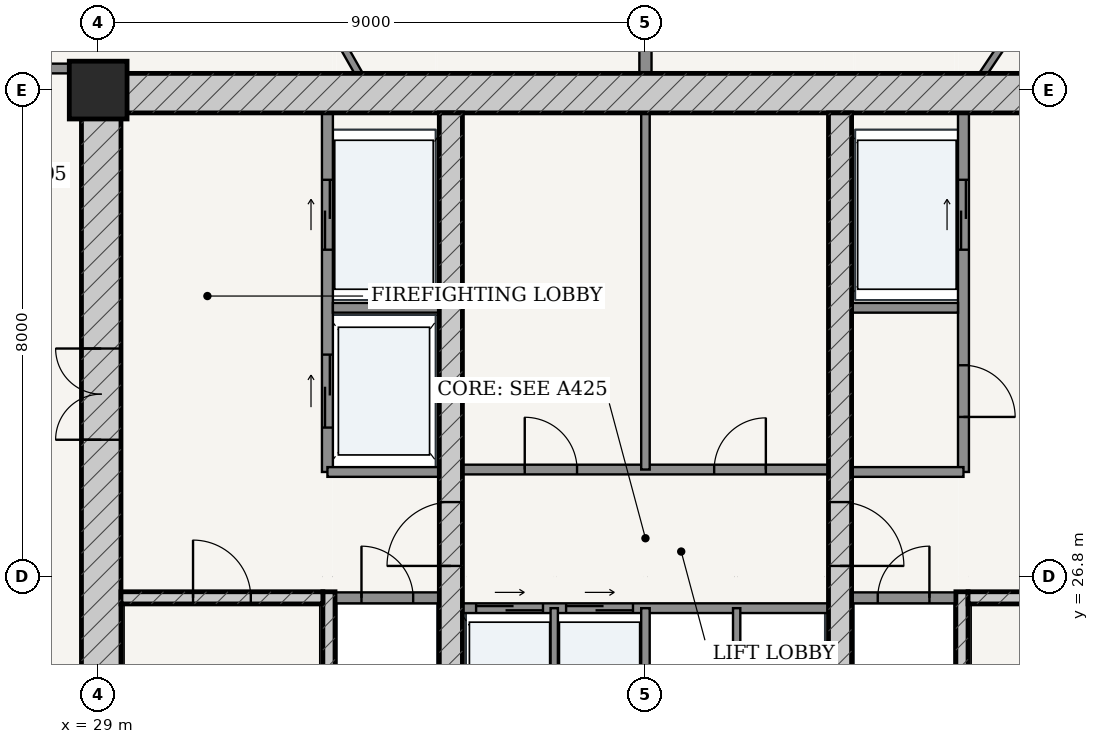
"""IFC4 building model, lengths in metres.
Left out: names, types, materials, properties, quantities, classifications, styles, units other than length and angle.
Written with IfcOpenShell. Run it as: python <this file> out.ifc"""

import sys

from ifc_helpers import new_model, si_unit, direction, frame, frame_2d, origin, origin_2d, place, context, subcontext, project, spatial, rectangle, extrude, source, transform, mapped, element, fill, save


model = new_model("IFC4")
c1 = context("Model", 3, precision=1e-05, world=origin(), true_north=direction((-0.2419218956, 0.970295726276)))
c2 = subcontext(c1, "Body", "Model", "MODEL_VIEW")
j1 = project(units=[si_unit("LENGTHUNIT", "METRE"), si_unit("PLANEANGLEUNIT", "RADIAN")], contexts=[c1])
p1 = place(None, origin())
s1 = spatial("IfcSite", under=j1, at=p1, CompositionType="ELEMENT")
p2 = place(p1, origin())
s2 = spatial("IfcBuilding", under=s1, at=p2, CompositionType="ELEMENT")
p3 = place(p2, frame((0.0, 0.0, 171.4)))
s3 = spatial("IfcBuildingStorey", under=s2, at=p3, CompositionType="ELEMENT", Elevation=171.4)
p4 = place(p3, frame((29.0, 34.8, 0.0), z_axis=(0.0, 0.0, 1.0), x_axis=(1.0, 0.0, 0.0)))
e1 = element("IfcColumn", 1, at=p4, inside=s3, PredefinedType="COLUMN", context=c2, shape_type="SweptSolid", body=[
    extrude(rectangle(XDim=0.95, YDim=0.95, at=origin_2d()), origin(), (0.0, 0.0, 1.0), 3.6),
])
p5 = place(p3, frame((28.725, 34.75, 0.0), z_axis=(0.0, 0.0, 1.0), x_axis=(1.0, 0.0, 0.0)))
e2 = element("IfcWall", 2, at=p5, inside=s3, PredefinedType="SHEAR", context=c2, shape_type="SweptSolid", body=[
    extrude(rectangle(XDim=18.55, YDim=0.65, at=frame_2d((9.275, 0.0))), origin(), (0.0, 0.0, 1.0), 3.33),
])
p6 = place(p3, frame((29.05, 19.175, 0.0), z_axis=(0.0, 0.0, 1.0), x_axis=(0.0, 1.0, 0.0)))
e3 = element("IfcWall", 3, at=p6, inside=s3, PredefinedType="SHEAR", context=c2, shape_type="SweptSolid", body=[
    extrude(rectangle(XDim=15.25, YDim=0.65, at=frame_2d((7.625, 0.0))), origin(), (0.0, 0.0, 1.0), 3.33),
])
p7 = place(p6, frame((9.875, 0.0, 0.0)))
e4 = element("IfcOpeningElement", 4, at=p7, cuts=e3, PredefinedType="OPENING", context=c2, shape_type="SweptSolid", body=[
    extrude(rectangle(XDim=1.5, YDim=2.2, at=frame_2d((0.75, 1.1))), frame((0.0, 0.335, 0.0), z_axis=(0.0, -1.0, 0.0), x_axis=(1.0, 0.0, 0.0)), (0.0, 0.0, 1.0), 0.67),
])
p8 = place(p3, frame((32.795, 19.175, 0.0), z_axis=(0.0, 0.0, 1.0), x_axis=(0.0, 1.0, 0.0)))
e5 = element("IfcWall", 5, at=p8, inside=s3, PredefinedType="SOLIDWALL", context=c2, shape_type="SweptSolid", body=[
    extrude(rectangle(XDim=7.375, YDim=0.2, at=frame_2d((3.688, 0.0))), origin(), (0.0, 0.0, 1.0), 3.33),
])
p9 = place(p3, frame((29.375, 26.45, 0.0), z_axis=(0.0, 0.0, 1.0), x_axis=(1.0, 0.0, 0.0)))
e6 = element("IfcWall", 6, at=p9, inside=s3, PredefinedType="SOLIDWALL", context=c2, shape_type="SweptSolid", body=[
    extrude(rectangle(XDim=3.32, YDim=0.2, at=frame_2d((1.66, 0.0))), origin(), (0.0, 0.0, 1.0), 3.33),
])
p10 = place(p9, frame((1.185, 0.0, 0.0)))
e7 = element("IfcOpeningElement", 7, at=p10, cuts=e6, PredefinedType="OPENING", context=c2, shape_type="SweptSolid", body=[
    extrude(rectangle(XDim=0.95, YDim=2.15, at=frame_2d((0.475, 1.075))), frame((0.0, 0.11, 0.0), z_axis=(0.0, -1.0, 0.0), x_axis=(1.0, 0.0, 0.0)), (0.0, 0.0, 1.0), 0.22),
])
p11 = place(p3, frame((43.205, 19.175, 0.0), z_axis=(0.0, 0.0, 1.0), x_axis=(0.0, 1.0, 0.0)))
e8 = element("IfcWall", 8, at=p11, inside=s3, PredefinedType="SOLIDWALL", context=c2, shape_type="SweptSolid", body=[
    extrude(rectangle(XDim=7.375, YDim=0.2, at=frame_2d((3.688, 0.0))), origin(), (0.0, 0.0, 1.0), 3.33),
])
p12 = place(p3, frame((43.305, 26.45, 0.0), z_axis=(0.0, 0.0, 1.0), x_axis=(1.0, 0.0, 0.0)))
e9 = element("IfcWall", 9, at=p12, inside=s3, PredefinedType="SOLIDWALL", context=c2, shape_type="SweptSolid", body=[
    extrude(rectangle(XDim=3.32, YDim=0.2, at=frame_2d((1.66, 0.0))), origin(), (0.0, 0.0, 1.0), 3.33),
])
p13 = place(p12, frame((1.185, 0.0, 0.0)))
e10 = element("IfcOpeningElement", 10, at=p13, cuts=e9, PredefinedType="OPENING", context=c2, shape_type="SweptSolid", body=[
    extrude(rectangle(XDim=0.95, YDim=2.15, at=frame_2d((0.475, 1.075))), frame((0.0, 0.11, 0.0), z_axis=(0.0, -1.0, 0.0), x_axis=(1.0, 0.0, 0.0)), (0.0, 0.0, 1.0), 0.22),
])
p14 = place(p3, frame((34.8, 19.175, 0.0), z_axis=(0.0, 0.0, 1.0), x_axis=(0.0, 1.0, 0.0)))
e11 = element("IfcWall", 11, at=p14, inside=s3, PredefinedType="SHEAR", context=c2, shape_type="SweptSolid", body=[
    extrude(rectangle(XDim=15.25, YDim=0.38, at=frame_2d((7.625, 0.0))), origin(), (0.0, 0.0, 1.0), 3.33),
])
p15 = place(p14, frame((7.8, 0.0, 0.0)))
e12 = element("IfcOpeningElement", 12, at=p15, cuts=e11, PredefinedType="OPENING", context=c2, shape_type="SweptSolid", body=[
    extrude(rectangle(XDim=1.05, YDim=2.15, at=frame_2d((0.525, 1.075))), frame((0.0, 0.2, 0.0), z_axis=(0.0, -1.0, 0.0), x_axis=(1.0, 0.0, 0.0)), (0.0, 0.0, 1.0), 0.4),
])
p16 = place(p3, frame((41.2, 19.175, 0.0), z_axis=(0.0, 0.0, 1.0), x_axis=(0.0, 1.0, 0.0)))
e13 = element("IfcWall", 13, at=p16, inside=s3, PredefinedType="SHEAR", context=c2, shape_type="SweptSolid", body=[
    extrude(rectangle(XDim=15.25, YDim=0.38, at=frame_2d((7.625, 0.0))), origin(), (0.0, 0.0, 1.0), 3.33),
])
p17 = place(p16, frame((7.8, 0.0, 0.0)))
e14 = element("IfcOpeningElement", 14, at=p17, cuts=e13, PredefinedType="OPENING", context=c2, shape_type="SweptSolid", body=[
    extrude(rectangle(XDim=1.05, YDim=2.15, at=frame_2d((0.525, 1.075))), frame((0.0, 0.2, 0.0), z_axis=(0.0, -1.0, 0.0), x_axis=(1.0, 0.0, 0.0)), (0.0, 0.0, 1.0), 0.4),
])
p18 = place(p3, frame((32.9, 26.45, 0.0), z_axis=(0.0, 0.0, 1.0), x_axis=(1.0, 0.0, 0.0)))
e15 = element("IfcWall", 15, at=p18, inside=s3, PredefinedType="PARTITIONING", context=c2, shape_type="SweptSolid", body=[
    extrude(rectangle(XDim=1.71, YDim=0.18, at=frame_2d((0.855, 0.0))), origin(), (0.0, 0.0, 1.0), 3.33),
])
p19 = place(p18, frame((0.43, 0.0, 0.0)))
e16 = element("IfcOpeningElement", 16, at=p19, cuts=e15, PredefinedType="OPENING", context=c2, shape_type="SweptSolid", body=[
    extrude(rectangle(XDim=0.85, YDim=2.1, at=frame_2d((0.425, 1.05))), frame((0.0, 0.1, 0.0), z_axis=(0.0, -1.0, 0.0), x_axis=(1.0, 0.0, 0.0)), (0.0, 0.0, 1.0), 0.2),
])
p20 = place(p3, frame((41.39, 26.45, 0.0), z_axis=(0.0, 0.0, 1.0), x_axis=(1.0, 0.0, 0.0)))
e17 = element("IfcWall", 17, at=p20, inside=s3, PredefinedType="PARTITIONING", context=c2, shape_type="SweptSolid", body=[
    extrude(rectangle(XDim=1.71, YDim=0.18, at=frame_2d((0.855, 0.0))), origin(), (0.0, 0.0, 1.0), 3.33),
])
p21 = place(p20, frame((0.43, 0.0, 0.0)))
e18 = element("IfcOpeningElement", 18, at=p21, cuts=e17, PredefinedType="OPENING", context=c2, shape_type="SweptSolid", body=[
    extrude(rectangle(XDim=0.85, YDim=2.1, at=frame_2d((0.425, 1.05))), frame((0.0, 0.1, 0.0), z_axis=(0.0, -1.0, 0.0), x_axis=(1.0, 0.0, 0.0)), (0.0, 0.0, 1.0), 0.2),
])
p22 = place(p3, frame((32.77, 28.52, 0.0), z_axis=(0.0, 0.0, 1.0), x_axis=(0.0, 1.0, 0.0)))
e19 = element("IfcWall", 19, at=p22, inside=s3, PredefinedType="PARTITIONING", context=c2, shape_type="SweptSolid", body=[
    extrude(rectangle(XDim=5.905, YDim=0.18, at=frame_2d((2.953, 0.0))), origin(), (0.0, 0.0, 1.0), 3.33),
])
p23 = place(p22, frame((3.655, 0.0, 0.0)))
e20 = element("IfcOpeningElement", 20, at=p23, cuts=e19, PredefinedType="OPENING", context=c2, shape_type="SweptSolid", body=[
    extrude(rectangle(XDim=1.15, YDim=2.2, at=frame_2d((0.575, 1.1))), frame((0.0, 0.1, 0.0), z_axis=(0.0, -1.0, 0.0), x_axis=(1.0, 0.0, 0.0)), (0.0, 0.0, 1.0), 0.2),
])
p24 = place(p22, frame((0.73, 0.0, 0.0)))
e21 = element("IfcOpeningElement", 21, at=p24, cuts=e19, PredefinedType="OPENING", context=c2, shape_type="SweptSolid", body=[
    extrude(rectangle(XDim=1.2, YDim=2.25, at=frame_2d((0.6, 1.125))), frame((0.0, 0.1, 0.0), z_axis=(0.0, -1.0, 0.0), x_axis=(1.0, 0.0, 0.0)), (0.0, 0.0, 1.0), 0.2),
])
p25 = place(p3, frame((32.86, 31.22, 0.0), z_axis=(0.0, 0.0, 1.0), x_axis=(1.0, 0.0, 0.0)))
e22 = element("IfcWall", 22, at=p25, inside=s3, PredefinedType="PARTITIONING", context=c2, shape_type="SweptSolid", body=[
    extrude(rectangle(XDim=1.75, YDim=0.16, at=frame_2d((0.875, 0.0))), origin(), (0.0, 0.0, 1.0), 3.33),
])
p26 = place(p3, frame((32.77, 28.52, 0.0), z_axis=(0.0, 0.0, 1.0), x_axis=(1.0, 0.0, 0.0)))
e23 = element("IfcWall", 23, at=p26, inside=s3, PredefinedType="PARTITIONING", context=c2, shape_type="SweptSolid", body=[
    extrude(rectangle(XDim=1.84, YDim=0.16, at=frame_2d((0.92, 0.0))), origin(), (0.0, 0.0, 1.0), 3.33),
])
p27 = place(p3, frame((43.23, 28.52, 0.0), z_axis=(0.0, 0.0, 1.0), x_axis=(0.0, 1.0, 0.0)))
e24 = element("IfcWall", 24, at=p27, inside=s3, PredefinedType="PARTITIONING", context=c2, shape_type="SweptSolid", body=[
    extrude(rectangle(XDim=5.905, YDim=0.18, at=frame_2d((2.953, 0.0))), origin(), (0.0, 0.0, 1.0), 3.33),
])
p28 = place(p27, frame((0.905, 0.0, 0.0)))
e25 = element("IfcOpeningElement", 25, at=p28, cuts=e24, PredefinedType="OPENING", context=c2, shape_type="SweptSolid", body=[
    extrude(rectangle(XDim=0.85, YDim=2.1, at=frame_2d((0.425, 1.05))), frame((0.0, 0.1, 0.0), z_axis=(0.0, -1.0, 0.0), x_axis=(1.0, 0.0, 0.0)), (0.0, 0.0, 1.0), 0.2),
])
p29 = place(p27, frame((3.655, 0.0, 0.0)))
e26 = element("IfcOpeningElement", 26, at=p29, cuts=e24, PredefinedType="OPENING", context=c2, shape_type="SweptSolid", body=[
    extrude(rectangle(XDim=1.15, YDim=2.2, at=frame_2d((0.575, 1.1))), frame((0.0, 0.1, 0.0), z_axis=(0.0, -1.0, 0.0), x_axis=(1.0, 0.0, 0.0)), (0.0, 0.0, 1.0), 0.2),
])
p30 = place(p3, frame((41.39, 31.22, 0.0), z_axis=(0.0, 0.0, 1.0), x_axis=(1.0, 0.0, 0.0)))
e27 = element("IfcWall", 27, at=p30, inside=s3, PredefinedType="PARTITIONING", context=c2, shape_type="SweptSolid", body=[
    extrude(rectangle(XDim=1.75, YDim=0.16, at=frame_2d((0.875, 0.0))), origin(), (0.0, 0.0, 1.0), 3.33),
])
p31 = place(p3, frame((41.39, 28.52, 0.0), z_axis=(0.0, 0.0, 1.0), x_axis=(1.0, 0.0, 0.0)))
e28 = element("IfcWall", 28, at=p31, inside=s3, PredefinedType="PARTITIONING", context=c2, shape_type="SweptSolid", body=[
    extrude(rectangle(XDim=1.84, YDim=0.16, at=frame_2d((0.92, 0.0))), origin(), (0.0, 0.0, 1.0), 3.33),
])
p32 = place(p3, frame((34.99, 28.56, 0.0), z_axis=(0.0, 0.0, 1.0), x_axis=(1.0, 0.0, 0.0)))
e29 = element("IfcWall", 29, at=p32, inside=s3, PredefinedType="PARTITIONING", context=c2, shape_type="SweptSolid", body=[
    extrude(rectangle(XDim=6.02, YDim=0.16, at=frame_2d((3.01, 0.0))), origin(), (0.0, 0.0, 1.0), 3.33),
])
p33 = place(p32, frame((1.025, 0.0, 0.0)))
e30 = element("IfcOpeningElement", 30, at=p33, cuts=e29, PredefinedType="OPENING", context=c2, shape_type="SweptSolid", body=[
    extrude(rectangle(XDim=0.86, YDim=2.1, at=frame_2d((0.43, 1.05))), frame((0.0, 0.09, 0.0), z_axis=(0.0, -1.0, 0.0), x_axis=(1.0, 0.0, 0.0)), (0.0, 0.0, 1.0), 0.18),
])
p34 = place(p32, frame((4.14, 0.0, 0.0)))
e31 = element("IfcOpeningElement", 31, at=p34, cuts=e29, PredefinedType="OPENING", context=c2, shape_type="SweptSolid", body=[
    extrude(rectangle(XDim=0.85, YDim=2.1, at=frame_2d((0.425, 1.05))), frame((0.0, 0.09, 0.0), z_axis=(0.0, -1.0, 0.0), x_axis=(1.0, 0.0, 0.0)), (0.0, 0.0, 1.0), 0.18),
])
p35 = place(p3, frame((38.0, 28.56, 0.0), z_axis=(0.0, 0.0, 1.0), x_axis=(0.0, 1.0, 0.0)))
e32 = element("IfcWall", 32, at=p35, inside=s3, PredefinedType="PARTITIONING", context=c2, shape_type="SweptSolid", body=[
    extrude(rectangle(XDim=5.865, YDim=0.14, at=frame_2d((2.933, 0.0))), origin(), (0.0, 0.0, 1.0), 3.33),
])
p36 = place(p3, frame((34.99, 26.28, 0.0), z_axis=(0.0, 0.0, 1.0), x_axis=(1.0, 0.0, 0.0)))
e33 = element("IfcWall", 33, at=p36, inside=s3, PredefinedType="PARTITIONING", context=c2, shape_type="SweptSolid", body=[
    extrude(rectangle(XDim=6.02, YDim=0.16, at=frame_2d((3.01, 0.0))), origin(), (0.0, 0.0, 1.0), 3.33),
])
p37 = place(p36, frame((0.225, 0.0, 0.0)))
e34 = element("IfcOpeningElement", 34, at=p37, cuts=e33, PredefinedType="OPENING", context=c2, shape_type="SweptSolid", body=[
    extrude(rectangle(XDim=1.1, YDim=2.2, at=frame_2d((0.55, 1.1))), frame((0.0, 0.09, 0.0), z_axis=(0.0, -1.0, 0.0), x_axis=(1.0, 0.0, 0.0)), (0.0, 0.0, 1.0), 0.18),
])
p38 = place(p36, frame((1.705, 0.0, 0.0)))
e35 = element("IfcOpeningElement", 35, at=p38, cuts=e33, PredefinedType="OPENING", context=c2, shape_type="SweptSolid", body=[
    extrude(rectangle(XDim=1.1, YDim=2.2, at=frame_2d((0.55, 1.1))), frame((0.0, 0.09, 0.0), z_axis=(0.0, -1.0, 0.0), x_axis=(1.0, 0.0, 0.0)), (0.0, 0.0, 1.0), 0.18),
])
p39 = place(p3, frame((36.5, 23.72, 0.0), z_axis=(0.0, 0.0, 1.0), x_axis=(0.0, 1.0, 0.0)))
e36 = element("IfcWall", 36, at=p39, inside=s3, PredefinedType="PARTITIONING", context=c2, shape_type="SweptSolid", body=[
    extrude(rectangle(XDim=2.56, YDim=0.12, at=frame_2d((1.28, 0.0))), origin(), (0.0, 0.0, 1.0), 3.33),
])
p40 = place(p3, frame((38.0, 23.72, 0.0), z_axis=(0.0, 0.0, 1.0), x_axis=(0.0, 1.0, 0.0)))
e37 = element("IfcWall", 37, at=p40, inside=s3, PredefinedType="PARTITIONING", context=c2, shape_type="SweptSolid", body=[
    extrude(rectangle(XDim=2.56, YDim=0.14, at=frame_2d((1.28, 0.0))), origin(), (0.0, 0.0, 1.0), 3.33),
])
p41 = place(p3, frame((39.5, 23.72, 0.0), z_axis=(0.0, 0.0, 1.0), x_axis=(0.0, 1.0, 0.0)))
e38 = element("IfcWall", 38, at=p41, inside=s3, PredefinedType="PARTITIONING", context=c2, shape_type="SweptSolid", body=[
    extrude(rectangle(XDim=2.56, YDim=0.12, at=frame_2d((1.28, 0.0))), origin(), (0.0, 0.0, 1.0), 3.33),
])
p42 = place(p3, frame((26.795, 35.155, 0.0), z_axis=(0.0, 0.0, 1.0), x_axis=(1.0, 0.0, 0.0)))
e39 = element("IfcWall", 39, at=p42, inside=s3, PredefinedType="PARTITIONING", context=c2, shape_type="SweptSolid", body=[
    extrude(rectangle(XDim=1.93, YDim=0.16, at=frame_2d((0.965, 0.0))), origin(), (0.0, 0.0, 1.0), 2.776),
])
p43 = place(p3, frame((38.0, 35.075, 0.0), z_axis=(0.0, 0.0, 1.0), x_axis=(0.0, 1.0, 0.0)))
e40 = element("IfcWall", 40, at=p43, inside=s3, PredefinedType="PARTITIONING", context=c2, shape_type="SweptSolid", body=[
    extrude(rectangle(XDim=12.465, YDim=0.2, at=frame_2d((6.232, 0.0))), origin(), (0.0, 0.0, 1.0), 2.415),
])
p44 = place(p3, frame((33.283, 35.075, 0.0), z_axis=(0.0, 0.0, 1.0), x_axis=(-0.495179611311, 0.868790626412, 0.0)))
e41 = element("IfcWall", 41, at=p44, inside=s3, PredefinedType="PARTITIONING", context=c2, shape_type="SweptSolid", body=[
    extrude(rectangle(XDim=2.988, YDim=0.12, at=frame_2d((1.494, 0.0))), origin(), (0.0, 0.0, 1.0), 3.33),
])
p45 = place(p44, frame((1.064, 0.0, 0.0)))
e42 = element("IfcOpeningElement", 42, at=p45, cuts=e41, PredefinedType="OPENING", context=c2, shape_type="SweptSolid", body=[
    extrude(rectangle(XDim=0.86, YDim=2.15, at=frame_2d((0.43, 1.075))), frame((0.0, 0.07, 0.0), z_axis=(0.0, -1.0, 0.0), x_axis=(1.0, 0.0, 0.0)), (0.0, 0.0, 1.0), 0.14),
])
p46 = place(p3, frame((43.559, 35.075, 0.0), z_axis=(0.0, 0.0, 1.0), x_axis=(0.557612855606, 0.830101140381, 0.0)))
e43 = element("IfcWall", 43, at=p46, inside=s3, PredefinedType="PARTITIONING", context=c2, shape_type="SweptSolid", body=[
    extrude(rectangle(XDim=3.323, YDim=0.12, at=frame_2d((1.662, 0.0))), origin(), (0.0, 0.0, 1.0), 3.33),
])
p47 = place(p46, frame((1.232, 0.0, 0.0)))
e44 = element("IfcOpeningElement", 44, at=p47, cuts=e43, PredefinedType="OPENING", context=c2, shape_type="SweptSolid", body=[
    extrude(rectangle(XDim=0.86, YDim=2.15, at=frame_2d((0.43, 1.075))), frame((0.0, 0.07, 0.0), z_axis=(0.0, -1.0, 0.0), x_axis=(1.0, 0.0, 0.0)), (0.0, 0.0, 1.0), 0.14),
])
m1 = source(origin(), c2, "Body", "SweptSolid", [
    extrude(rectangle(XDim=1.5, YDim=2.2, at=frame_2d((0.75, 1.1))), frame((0.0, 0.025, 0.0), z_axis=(0.0, -1.0, 0.0), x_axis=(1.0, 0.0, 0.0)), (0.0, 0.0, 1.0), 0.05),
])
p48 = place(p7, origin())
e45 = element("IfcDoor", 45, at=p48, inside=s3, OperationType="DOUBLE_DOOR_SINGLE_SWING", PredefinedType="DOOR", context=c2, shape_type="MappedRepresentation", body=[
    mapped(m1, transform((0.0, 0.0, 0.0), scale=1.0)),
])
fill(e4, e45)
m2 = source(origin(), c2, "Body", "SweptSolid", [
    extrude(rectangle(XDim=1.05, YDim=2.15, at=frame_2d((0.525, 1.075))), frame((0.0, 0.025, 0.0), z_axis=(0.0, -1.0, 0.0), x_axis=(1.0, 0.0, 0.0)), (0.0, 0.0, 1.0), 0.05),
])
p49 = place(p15, origin())
e46 = element("IfcDoor", 46, at=p49, inside=s3, OperationType="SINGLE_SWING_LEFT", PredefinedType="DOOR", context=c2, shape_type="MappedRepresentation", body=[
    mapped(m2, transform((0.0, 0.0, 0.0), scale=1.0)),
])
fill(e12, e46)
p50 = place(p17, frame((1.05, 0.0, 0.0), z_axis=(0.0, 0.0, 1.0), x_axis=(-1.0, 0.0, 0.0)))
e47 = element("IfcDoor", 47, at=p50, inside=s3, OperationType="SINGLE_SWING_RIGHT", PredefinedType="DOOR", context=c2, shape_type="MappedRepresentation", body=[
    mapped(m2, transform((0.0, 0.0, 0.0), scale=1.0)),
])
fill(e14, e47)
m3 = source(origin(), c2, "Body", "SweptSolid", [
    extrude(rectangle(XDim=0.95, YDim=2.15, at=frame_2d((0.475, 1.075))), frame((0.0, 0.025, 0.0), z_axis=(0.0, -1.0, 0.0), x_axis=(1.0, 0.0, 0.0)), (0.0, 0.0, 1.0), 0.05),
])
p51 = place(p10, origin())
e48 = element("IfcDoor", 48, at=p51, inside=s3, OperationType="SINGLE_SWING_LEFT", PredefinedType="DOOR", context=c2, shape_type="MappedRepresentation", body=[
    mapped(m3, transform((0.0, 0.0, 0.0), scale=1.0)),
])
fill(e7, e48)
m4 = source(origin(), c2, "Body", "SweptSolid", [
    extrude(rectangle(XDim=0.85, YDim=2.1, at=frame_2d((0.425, 1.05))), frame((0.0, 0.025, 0.0), z_axis=(0.0, -1.0, 0.0), x_axis=(1.0, 0.0, 0.0)), (0.0, 0.0, 1.0), 0.05),
])
p52 = place(p19, origin())
e49 = element("IfcDoor", 49, at=p52, inside=s3, OperationType="SINGLE_SWING_LEFT", PredefinedType="DOOR", context=c2, shape_type="MappedRepresentation", body=[
    mapped(m4, transform((0.0, 0.0, 0.0), scale=1.0)),
])
fill(e16, e49)
p53 = place(p21, origin())
e50 = element("IfcDoor", 50, at=p53, inside=s3, OperationType="SINGLE_SWING_RIGHT", PredefinedType="DOOR", context=c2, shape_type="MappedRepresentation", body=[
    mapped(m4, transform((0.0, 0.0, 0.0), scale=1.0)),
])
fill(e18, e50)
p54 = place(p28, frame((0.85, 0.0, 0.0), z_axis=(0.0, 0.0, 1.0), x_axis=(-1.0, 0.0, 0.0)))
e51 = element("IfcDoor", 51, at=p54, inside=s3, OperationType="SINGLE_SWING_RIGHT", PredefinedType="DOOR", context=c2, shape_type="MappedRepresentation", body=[
    mapped(m4, transform((0.0, 0.0, 0.0), scale=1.0)),
])
fill(e25, e51)
m5 = source(origin(), c2, "Body", "SweptSolid", [
    extrude(rectangle(XDim=0.86, YDim=2.1, at=frame_2d((0.43, 1.05))), frame((0.0, 0.025, 0.0), z_axis=(0.0, -1.0, 0.0), x_axis=(1.0, 0.0, 0.0)), (0.0, 0.0, 1.0), 0.05),
])
p55 = place(p33, origin())
e52 = element("IfcDoor", 52, at=p55, inside=s3, OperationType="SINGLE_SWING_LEFT", PredefinedType="DOOR", context=c2, shape_type="MappedRepresentation", body=[
    mapped(m5, transform((0.0, 0.0, 0.0), scale=1.0)),
])
fill(e30, e52)
p56 = place(p34, origin())
e53 = element("IfcDoor", 53, at=p56, inside=s3, OperationType="SINGLE_SWING_RIGHT", PredefinedType="DOOR", context=c2, shape_type="MappedRepresentation", body=[
    mapped(m4, transform((0.0, 0.0, 0.0), scale=1.0)),
])
fill(e31, e53)
m6 = source(origin(), c2, "Body", "SweptSolid", [
    extrude(rectangle(XDim=1.15, YDim=2.2, at=frame_2d((0.575, 1.1))), frame((0.0, 0.025, 0.0), z_axis=(0.0, -1.0, 0.0), x_axis=(1.0, 0.0, 0.0)), (0.0, 0.0, 1.0), 0.05),
])
p57 = place(p23, origin())
e54 = element("IfcDoor", 54, at=p57, inside=s3, OperationType="DOUBLE_DOOR_SLIDING", PredefinedType="DOOR", context=c2, shape_type="MappedRepresentation", body=[
    mapped(m6, transform((0.0, 0.0, 0.0), scale=1.0)),
])
fill(e20, e54)
p58 = place(p29, origin())
e55 = element("IfcDoor", 55, at=p58, inside=s3, OperationType="DOUBLE_DOOR_SLIDING", PredefinedType="DOOR", context=c2, shape_type="MappedRepresentation", body=[
    mapped(m6, transform((0.0, 0.0, 0.0), scale=1.0)),
])
fill(e26, e55)
m7 = source(origin(), c2, "Body", "SweptSolid", [
    extrude(rectangle(XDim=1.2, YDim=2.25, at=frame_2d((0.6, 1.125))), frame((0.0, 0.025, 0.0), z_axis=(0.0, -1.0, 0.0), x_axis=(1.0, 0.0, 0.0)), (0.0, 0.0, 1.0), 0.05),
])
p59 = place(p24, origin())
e56 = element("IfcDoor", 56, at=p59, inside=s3, OperationType="DOUBLE_DOOR_SLIDING", PredefinedType="DOOR", context=c2, shape_type="MappedRepresentation", body=[
    mapped(m7, transform((0.0, 0.0, 0.0), scale=1.0)),
])
fill(e21, e56)
m8 = source(origin(), c2, "Body", "SweptSolid", [
    extrude(rectangle(XDim=1.1, YDim=2.2, at=frame_2d((0.55, 1.1))), frame((0.0, 0.025, 0.0), z_axis=(0.0, -1.0, 0.0), x_axis=(1.0, 0.0, 0.0)), (0.0, 0.0, 1.0), 0.05),
])
p60 = place(p37, origin())
e57 = element("IfcDoor", 57, at=p60, inside=s3, OperationType="DOUBLE_DOOR_SLIDING", PredefinedType="DOOR", context=c2, shape_type="MappedRepresentation", body=[
    mapped(m8, transform((0.0, 0.0, 0.0), scale=1.0)),
])
fill(e34, e57)
p61 = place(p38, origin())
e58 = element("IfcDoor", 58, at=p61, inside=s3, OperationType="DOUBLE_DOOR_SLIDING", PredefinedType="DOOR", context=c2, shape_type="MappedRepresentation", body=[
    mapped(m8, transform((0.0, 0.0, 0.0), scale=1.0)),
])
fill(e35, e58)
save(model, sys.argv[1])
